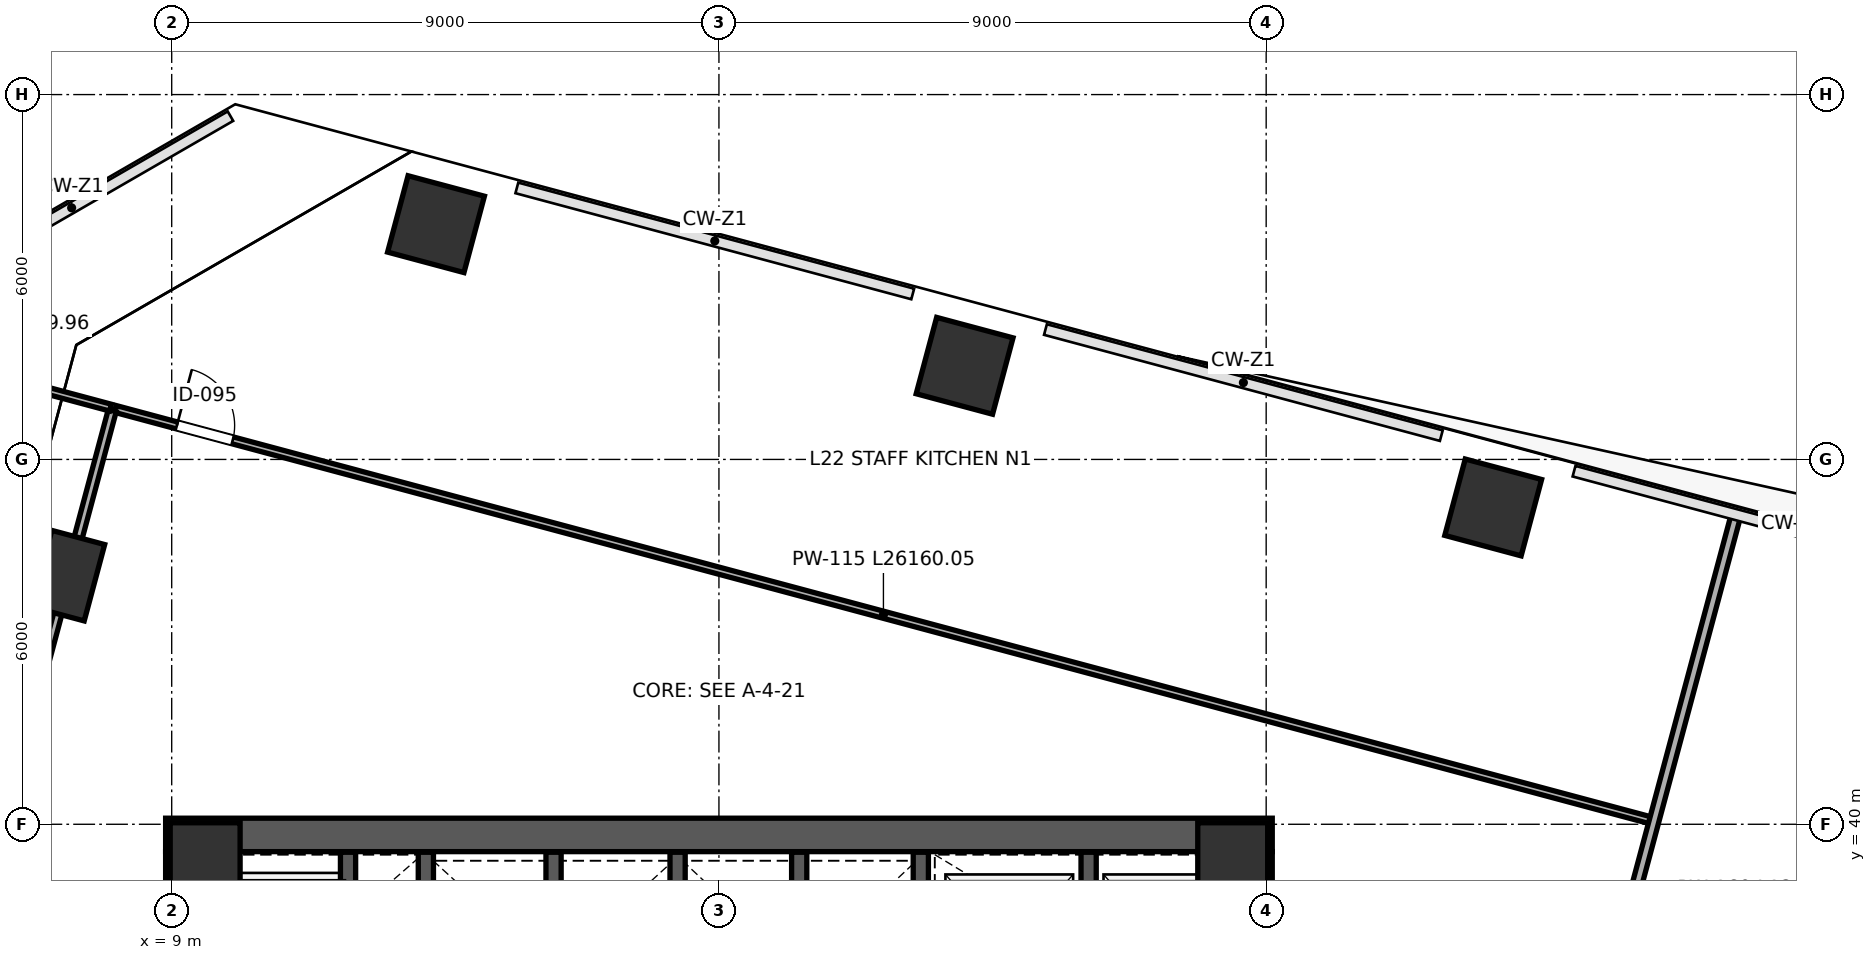
"""IFC4 building model, lengths in metres.
Left out: names, types, materials, properties, quantities, classifications, styles, units other than length and angle.
Written with IfcOpenShell. Run it as: python <this file> out.ifc"""

import sys

from ifc_helpers import new_model, si_unit, direction, frame, frame_2d, origin, origin_2d, place, context, subcontext, project, spatial, rectangle, extrude, source, transform, mapped, element, fill, save


model = new_model("IFC4")
c1 = context("Model", 3, precision=1e-05, world=origin(), true_north=direction((0.0, 1.0)))
c2 = subcontext(c1, "Body", "Model", "MODEL_VIEW")
j1 = project(units=[si_unit("LENGTHUNIT", "METRE"), si_unit("PLANEANGLEUNIT", "RADIAN")], contexts=[c1])
p1 = place(None, origin())
s1 = spatial("IfcSite", under=j1, at=p1, CompositionType="ELEMENT")
p2 = place(p1, origin())
s2 = spatial("IfcBuilding", under=s1, at=p2, CompositionType="ELEMENT")
p3 = place(p2, frame((0.0, 0.0, 100.0)))
s3 = spatial("IfcBuildingStorey", under=s2, at=p3, CompositionType="ELEMENT", Elevation=100.0)
m1 = source(origin(), c2, "Body", "SweptSolid", [
    extrude(rectangle(XDim=1.15, YDim=1.15, at=origin_2d()), origin(), (0.0, 0.0, 1.0), 4.198),
])
for number, where, z_axis, x_axis in (
    (1, (9.55, 39.45, 0.001), (0.0, 0.0, 1.0), (1.0, 0.0, 0.0)),
    (2, (26.45, 39.45, 0.001), (0.0, 0.0, 1.0), (1.0, 0.0, 0.0)),
):
    element("IfcColumn", number, at=place(p3, frame(where, z_axis=z_axis, x_axis=x_axis)), inside=s3, PredefinedType="COLUMN", context=c2, shape_type="MappedRepresentation", body=[
        mapped(m1, transform((0.0, 0.0, 0.0), scale=1.0)),
    ])
m2 = source(origin(), c2, "Body", "SweptSolid", [
    extrude(rectangle(XDim=1.3, YDim=1.3, at=origin_2d()), origin(), (0.0, 0.0, 1.0), 4.198),
])
for number, where, z_axis, x_axis in (
    (3, (13.347, 49.869, 0.001), (0.0, 0.0, 1.0), (-0.966, 0.259, 0.0)),
    (4, (22.04, 47.54, 0.001), (0.0, 0.0, 1.0), (-0.966, 0.259, 0.0)),
    (5, (30.734, 45.21, 0.001), (0.0, 0.0, 1.0), (-0.966, 0.259, 0.0)),
):
    element("IfcColumn", number, at=place(p3, frame(where, z_axis=z_axis, x_axis=x_axis)), inside=s3, PredefinedType="COLUMN", context=c2, shape_type="MappedRepresentation", body=[
        mapped(m2, transform((0.0, 0.0, 0.0), scale=1.0)),
    ])
m3 = source(origin(), c2, "Body", "SweptSolid", [
    extrude(rectangle(XDim=0.9, YDim=1.3, at=origin_2d()), origin(), (0.0, 0.0, 1.0), 4.198),
])
p4 = place(p3, frame((7.295, 44.088, 0.001), z_axis=(0.0, 0.0, 1.0), x_axis=(-0.965925826289, 0.258819045103, 0.0)))
e6 = element("IfcColumn", 6, at=p4, inside=s3, PredefinedType="PILASTER", context=c2, shape_type="MappedRepresentation", body=[
    mapped(m3, transform((0.0, 0.0, 0.0), scale=1.0)),
])
p5 = place(p3, frame((9.175, 24.45, 0.0), z_axis=(0.0, 0.0, 1.0), x_axis=(0.0, 1.0, 0.0)))
e7 = element("IfcWall", 7, at=p5, inside=s3, PredefinedType="SHEAR", context=c2, shape_type="SweptSolid", body=[
    extrude(rectangle(XDim=15.1, YDim=0.55, at=frame_2d((7.55, 0.0))), origin(), (0.0, 0.0, 1.0), 3.96),
])
p6 = place(p3, frame((26.825, 24.45, 0.0), z_axis=(0.0, 0.0, 1.0), x_axis=(0.0, 1.0, 0.0)))
e8 = element("IfcWall", 8, at=p6, inside=s3, PredefinedType="SHEAR", context=c2, shape_type="SweptSolid", body=[
    extrude(rectangle(XDim=15.1, YDim=0.55, at=frame_2d((7.55, 0.0))), origin(), (0.0, 0.0, 1.0), 3.96),
])
p7 = place(p6, frame((8.6, 0.0, 0.0)))
e9 = element("IfcOpeningElement", 9, at=p7, cuts=e8, PredefinedType="OPENING", context=c2, shape_type="SweptSolid", body=[
    extrude(rectangle(XDim=1.15, YDim=2.2, at=frame_2d((0.575, 1.1))), frame((0.0, 0.285, 0.0), z_axis=(0.0, -1.0, 0.0), x_axis=(1.0, 0.0, 0.0)), (0.0, 0.0, 1.0), 0.57),
])
p8 = place(p3, frame((8.9, 39.825, 0.0), z_axis=(0.0, 0.0, 1.0), x_axis=(1.0, 0.0, 0.0)))
e10 = element("IfcWall", 10, at=p8, inside=s3, PredefinedType="SHEAR", context=c2, shape_type="SweptSolid", body=[
    extrude(rectangle(XDim=18.2, YDim=0.55, at=frame_2d((9.1, 0.0))), origin(), (0.0, 0.0, 1.0), 3.96),
])
p9 = place(p3, frame((21.32, 32.12, 0.0), z_axis=(0.0, 0.0, 1.0), x_axis=(0.0, 1.0, 0.0)))
e11 = element("IfcWall", 11, at=p9, inside=s3, PredefinedType="SHEAR", context=c2, shape_type="SweptSolid", body=[
    extrude(rectangle(XDim=7.42, YDim=0.25, at=frame_2d((3.71, 0.0))), origin(), (0.0, 0.0, 1.0), 3.96),
])
p10 = place(p9, frame((1.4, 0.0, 0.0)))
e12 = element("IfcOpeningElement", 12, at=p10, cuts=e11, PredefinedType="OPENING", context=c2, shape_type="SweptSolid", body=[
    extrude(rectangle(XDim=1.15, YDim=2.2, at=frame_2d((0.575, 1.1))), frame((0.0, 0.135, 0.0), z_axis=(0.0, -1.0, 0.0), x_axis=(1.0, 0.0, 0.0)), (0.0, 0.0, 1.0), 0.27),
])
p11 = place(p3, frame((11.9, 36.31, 0.0), z_axis=(0.0, 0.0, 1.0), x_axis=(0.0, 1.0, 0.0)))
e13 = element("IfcWall", 13, at=p11, inside=s3, PredefinedType="SHEAR", context=c2, shape_type="SweptSolid", body=[
    extrude(rectangle(XDim=3.23, YDim=0.25, at=frame_2d((1.615, 0.0))), origin(), (0.0, 0.0, 1.0), 3.96),
])
p12 = place(p3, frame((24.08, 36.48, 0.0), z_axis=(0.0, 0.0, 1.0), x_axis=(0.0, 1.0, 0.0)))
e14 = element("IfcWall", 14, at=p12, inside=s3, PredefinedType="SHEAR", context=c2, shape_type="SweptSolid", body=[
    extrude(rectangle(XDim=3.06, YDim=0.25, at=frame_2d((1.53, 0.0))), origin(), (0.0, 0.0, 1.0), 3.96),
])
for number, where, z_axis, x_axis in (
    (15, (13.18, 35.81, 0.0), (0.0, 0.0, 1.0), (0.0, 1.0, 0.0)),
    (16, (15.28, 35.81, 0.0), (0.0, 0.0, 1.0), (0.0, 1.0, 0.0)),
    (17, (17.32, 35.81, 0.0), (0.0, 0.0, 1.0), (0.0, 1.0, 0.0)),
    (18, (19.32, 35.81, 0.0), (0.0, 0.0, 1.0), (0.0, 1.0, 0.0)),
):
    element("IfcWall", number, at=place(p3, frame(where, z_axis=z_axis, x_axis=x_axis)), inside=s3, PredefinedType="SHEAR", context=c2, shape_type="SweptSolid", body=[
        extrude(rectangle(XDim=3.73, YDim=0.25, at=frame_2d((1.865, 0.0))), origin(), (0.0, 0.0, 1.0), 3.96),
    ])
p13 = place(p3, frame((8.071, 46.831, 0.0), z_axis=(0.0, 0.0, 1.0), x_axis=(0.965925848141, -0.258818963551, 0.0)))
e19 = element("IfcWall", 19, at=p13, inside=s3, PredefinedType="PARTITIONING", context=c2, shape_type="SweptSolid", body=[
    extrude(rectangle(XDim=26.16, YDim=0.115, at=frame_2d((13.08, 0.0))), origin(), (0.0, 0.0, 1.0), 3.96),
])
p14 = place(p13, frame((1.05, 0.0, 0.0)))
e20 = element("IfcOpeningElement", 20, at=p14, cuts=e19, PredefinedType="OPENING", context=c2, shape_type="SweptSolid", body=[
    extrude(rectangle(XDim=0.95, YDim=2.15, at=frame_2d((0.475, 1.075))), frame((0.0, 0.067, 0.0), z_axis=(0.0, -1.0, 0.0), x_axis=(1.0, 0.0, 0.0)), (0.0, 0.0, 1.0), 0.135),
])
p15 = place(p3, frame((1.678, 23.128, 0.0), z_axis=(0.0, 0.0, 1.0), x_axis=(0.258813756198, 0.965927243431, 0.0)))
e21 = element("IfcWall", 21, at=p15, inside=s3, PredefinedType="PARTITIONING", context=c2, shape_type="SweptSolid", body=[
    extrude(rectangle(XDim=24.51, YDim=0.135, at=frame_2d((12.255, 0.0))), origin(), (0.0, 0.0, 1.0), 2.795),
])
p16 = place(p15, frame((2.6, 0.0, 0.0)))
e22 = element("IfcOpeningElement", 22, at=p16, cuts=e21, PredefinedType="OPENING", context=c2, shape_type="SweptSolid", body=[
    extrude(rectangle(XDim=0.95, YDim=2.15, at=frame_2d((0.475, 1.075))), frame((0.0, 0.078, 0.0), z_axis=(0.0, -1.0, 0.0), x_axis=(1.0, 0.0, 0.0)), (0.0, 0.0, 1.0), 0.155),
])
p17 = place(p3, frame((4.487, 47.791, 0.0), z_axis=(0.0, 0.0, 1.0), x_axis=(0.965930639999, -0.258801079426, 0.0)))
e23 = element("IfcWall", 23, at=p17, inside=s3, PredefinedType="PARTITIONING", context=c2, shape_type="SweptSolid", body=[
    extrude(rectangle(XDim=3.63, YDim=0.115, at=frame_2d((1.815, 0.0))), origin(), (0.0, 0.0, 1.0), 3.96),
])
p18 = place(p3, frame((31.445, 32.834, 0.0), z_axis=(0.0, 0.0, 1.0), x_axis=(0.258816538161, 0.965926498018, 0.0)))
e24 = element("IfcWall", 24, at=p18, inside=s3, PredefinedType="PARTITIONING", context=c2, shape_type="SweptSolid", body=[
    extrude(rectangle(XDim=12.64, YDim=0.16, at=frame_2d((6.32, 0.0))), origin(), (0.0, 0.0, 1.0), 3.095),
])
m4 = source(origin(), c2, "Body", "SweptSolid", [
    extrude(rectangle(XDim=0.95, YDim=2.15, at=frame_2d((0.475, 1.075))), frame((0.0, 0.025, 0.0), z_axis=(0.0, -1.0, 0.0), x_axis=(1.0, 0.0, 0.0)), (0.0, 0.0, 1.0), 0.05),
])
p19 = place(p14, origin())
e25 = element("IfcDoor", 25, at=p19, inside=s3, OperationType="SINGLE_SWING_LEFT", PredefinedType="DOOR", context=c2, shape_type="MappedRepresentation", body=[
    mapped(m4, transform((0.0, 0.0, 0.0), scale=1.0)),
])
fill(e20, e25)
save(model, sys.argv[1])
